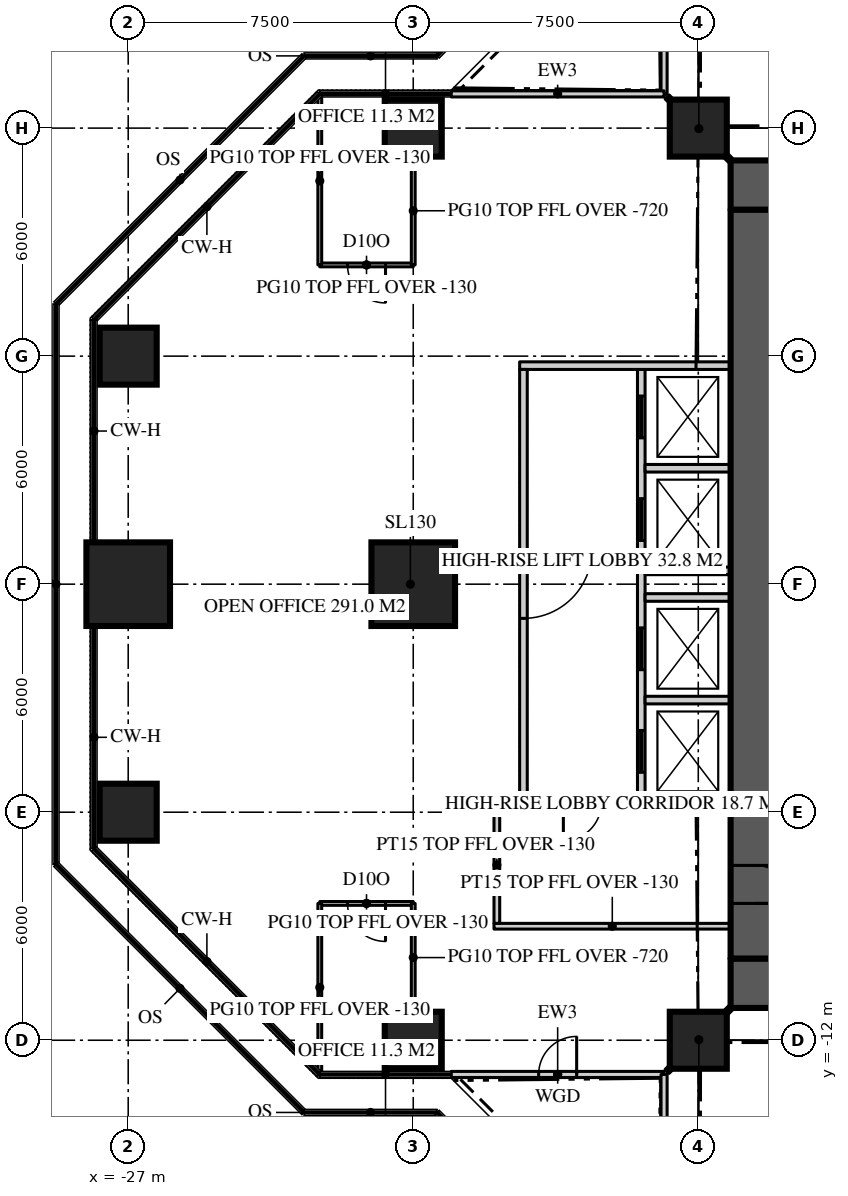
"""IFC4 building model, lengths in metres.
Left out: names, types, materials, properties, quantities, classifications, styles, units other than length and angle.
Written with IfcOpenShell. Run it as: python <this file> out.ifc"""

import sys

from ifc_helpers import new_model, si_unit, direction, frame, frame_2d, origin, origin_2d, place, context, subcontext, project, spatial, rectangle, extrude, element, fill, save


model = new_model("IFC4")
c1 = context("Model", 3, precision=1e-05, world=origin(), true_north=direction((0.0, 1.0)))
c2 = subcontext(c1, "Body", "Model", "MODEL_VIEW")
j1 = project(units=[si_unit("LENGTHUNIT", "METRE"), si_unit("PLANEANGLEUNIT", "RADIAN")], contexts=[c1])
p1 = place(None, origin())
s1 = spatial("IfcSite", under=j1, at=p1, CompositionType="ELEMENT")
p2 = place(p1, origin())
s2 = spatial("IfcBuilding", under=s1, at=p2, CompositionType="ELEMENT")
p3 = place(p2, frame((0.0, 0.0, 212.7)))
s3 = spatial("IfcBuildingStorey", under=s2, at=p3, CompositionType="ELEMENT", Elevation=212.7)
p4 = place(p3, frame((-11.15, 10.5, 0.0), z_axis=(0.0, 0.0, 1.0), x_axis=(1.0, 0.0, 0.0)))
e1 = element("IfcWall", 1, at=p4, inside=s3, PredefinedType="SHEAR", context=c2, shape_type="SweptSolid", body=[
    extrude(rectangle(XDim=22.3, YDim=1.3, at=frame_2d((11.15, 0.0))), origin(), (0.0, 0.0, 1.0), 3.9),
])
p5 = place(p4, frame((4.25, 0.0, 0.0)))
e2 = element("IfcOpeningElement", 2, at=p5, cuts=e1, PredefinedType="OPENING", context=c2, shape_type="SweptSolid", body=[
    extrude(rectangle(XDim=1.8, YDim=2.2, at=frame_2d((0.9, 1.1))), frame((0.0, 0.66, 0.0), z_axis=(0.0, -1.0, 0.0), x_axis=(1.0, 0.0, 0.0)), (0.0, 0.0, 1.0), 1.32),
])
p6 = place(p4, frame((16.25, 0.0, 0.0)))
e3 = element("IfcOpeningElement", 3, at=p6, cuts=e1, PredefinedType="OPENING", context=c2, shape_type="SweptSolid", body=[
    extrude(rectangle(XDim=1.8, YDim=2.2, at=frame_2d((0.9, 1.1))), frame((0.0, 0.66, 0.0), z_axis=(0.0, -1.0, 0.0), x_axis=(1.0, 0.0, 0.0)), (0.0, 0.0, 1.0), 1.32),
])
p7 = place(p3, frame((11.15, -10.5, 0.0), z_axis=(0.0, 0.0, 1.0), x_axis=(-1.0, 0.0, 0.0)))
e4 = element("IfcWall", 4, at=p7, inside=s3, PredefinedType="SHEAR", context=c2, shape_type="SweptSolid", body=[
    extrude(rectangle(XDim=22.3, YDim=1.3, at=frame_2d((11.15, 0.0))), origin(), (0.0, 0.0, 1.0), 3.9),
])
p8 = place(p7, frame((16.25, 0.0, 0.0)))
e5 = element("IfcOpeningElement", 5, at=p8, cuts=e4, PredefinedType="OPENING", context=c2, shape_type="SweptSolid", body=[
    extrude(rectangle(XDim=1.8, YDim=2.2, at=frame_2d((0.9, 1.1))), frame((0.0, 0.66, 0.0), z_axis=(0.0, -1.0, 0.0), x_axis=(1.0, 0.0, 0.0)), (0.0, 0.0, 1.0), 1.32),
])
p9 = place(p7, frame((4.25, 0.0, 0.0)))
e6 = element("IfcOpeningElement", 6, at=p9, cuts=e4, PredefinedType="OPENING", context=c2, shape_type="SweptSolid", body=[
    extrude(rectangle(XDim=1.8, YDim=2.2, at=frame_2d((0.9, 1.1))), frame((0.0, 0.66, 0.0), z_axis=(0.0, -1.0, 0.0), x_axis=(1.0, 0.0, 0.0)), (0.0, 0.0, 1.0), 1.32),
])
p10 = place(p3, frame((-10.5, 9.85, 0.0), z_axis=(0.0, 0.0, 1.0), x_axis=(0.0, -1.0, 0.0)))
e7 = element("IfcWall", 7, at=p10, inside=s3, PredefinedType="SHEAR", context=c2, shape_type="SweptSolid", body=[
    extrude(rectangle(XDim=19.7, YDim=1.3, at=frame_2d((9.85, 0.0))), origin(), (0.0, 0.0, 1.0), 3.9),
])
p11 = place(p10, frame((17.25, 0.0, 0.0)))
e8 = element("IfcOpeningElement", 8, at=p11, cuts=e7, PredefinedType="OPENING", context=c2, shape_type="SweptSolid", body=[
    extrude(rectangle(XDim=1.0, YDim=2.2, at=frame_2d((0.5, 1.1))), frame((0.0, 0.66, 0.0), z_axis=(0.0, -1.0, 0.0), x_axis=(1.0, 0.0, 0.0)), (0.0, 0.0, 1.0), 1.32),
])
for number, where, z_axis, x_axis in (
    (9, (-19.5, -12.0, 0.0), (0.0, 0.0, 1.0), (1.0, 0.0, 0.0)),
    (10, (-12.0, -12.0, 0.0), (0.0, 0.0, 1.0), (1.0, 0.0, 0.0)),
    (11, (-27.0, -6.0, 0.0), (0.0, 0.0, 1.0), (1.0, 0.0, 0.0)),
):
    element("IfcColumn", number, at=place(p3, frame(where, z_axis=z_axis, x_axis=x_axis)), inside=s3, PredefinedType="COLUMN", context=c2, shape_type="SweptSolid", body=[
        extrude(rectangle(XDim=1.5, YDim=1.5, at=origin_2d()), origin(), (0.0, 0.0, 1.0), 3.9),
    ])
for number, where, z_axis, x_axis in (
    (12, (-27.0, 0.0, 0.0), (0.0, 0.0, 1.0), (1.0, 0.0, 0.0)),
    (13, (-19.5, 0.0, 0.0), (0.0, 0.0, 1.0), (1.0, 0.0, 0.0)),
):
    element("IfcColumn", number, at=place(p3, frame(where, z_axis=z_axis, x_axis=x_axis)), inside=s3, PredefinedType="COLUMN", context=c2, shape_type="SweptSolid", body=[
        extrude(rectangle(XDim=2.2, YDim=2.2, at=origin_2d()), origin(), (0.0, 0.0, 1.0), 3.9),
    ])
for number, where, z_axis, x_axis in (
    (14, (-27.0, 6.0, 0.0), (0.0, 0.0, 1.0), (1.0, 0.0, 0.0)),
    (15, (-19.5, 12.0, 0.0), (0.0, 0.0, 1.0), (1.0, 0.0, 0.0)),
    (16, (-12.0, 12.0, 0.0), (0.0, 0.0, 1.0), (1.0, 0.0, 0.0)),
):
    element("IfcColumn", number, at=place(p3, frame(where, z_axis=z_axis, x_axis=x_axis)), inside=s3, PredefinedType="COLUMN", context=c2, shape_type="SweptSolid", body=[
        extrude(rectangle(XDim=1.5, YDim=1.5, at=origin_2d()), origin(), (0.0, 0.0, 1.0), 3.9),
    ])
p12 = place(p3, frame((-12.9, 18.5, 0.0), z_axis=(0.0, 0.0, 1.0), x_axis=(0.0, -1.0, 0.0)))
e17 = element("IfcWall", 17, at=p12, inside=s3, PredefinedType="SOLIDWALL", context=c2, shape_type="SweptSolid", body=[
    extrude(rectangle(XDim=5.6, YDim=0.16, at=frame_2d((2.8, 0.0))), origin(), (0.0, 0.0, 1.0), 3.77),
])
p13 = place(p12, frame((2.3, 0.0, 0.0)))
e18 = element("IfcOpeningElement", 18, at=p13, cuts=e17, PredefinedType="OPENING", context=c2, shape_type="SweptSolid", body=[
    extrude(rectangle(XDim=1.0, YDim=2.2, at=frame_2d((0.5, 1.1))), frame((0.0, 0.09, 0.0), z_axis=(0.0, -1.0, 0.0), x_axis=(1.0, 0.0, 0.0)), (0.0, 0.0, 1.0), 0.18),
])
p14 = place(p3, frame((-12.9, 12.9, 0.0), z_axis=(0.0, 0.0, 1.0), x_axis=(-1.0, 0.0, 0.0)))
e19 = element("IfcWall", 19, at=p14, inside=s3, PredefinedType="SOLIDWALL", context=c2, shape_type="SweptSolid", body=[
    extrude(rectangle(XDim=5.6, YDim=0.16, at=frame_2d((2.8, 0.0))), origin(), (0.0, 0.0, 1.0), 3.77),
])
p15 = place(p3, frame((-18.5, -12.9, 0.0), z_axis=(0.0, 0.0, 1.0), x_axis=(1.0, 0.0, 0.0)))
e20 = element("IfcWall", 20, at=p15, inside=s3, PredefinedType="SOLIDWALL", context=c2, shape_type="SweptSolid", body=[
    extrude(rectangle(XDim=5.6, YDim=0.16, at=frame_2d((2.8, 0.0))), origin(), (0.0, 0.0, 1.0), 3.77),
])
p16 = place(p15, frame((2.3, 0.0, 0.0)))
e21 = element("IfcOpeningElement", 21, at=p16, cuts=e20, PredefinedType="OPENING", context=c2, shape_type="SweptSolid", body=[
    extrude(rectangle(XDim=1.0, YDim=2.2, at=frame_2d((0.5, 1.1))), frame((0.0, 0.09, 0.0), z_axis=(0.0, -1.0, 0.0), x_axis=(1.0, 0.0, 0.0)), (0.0, 0.0, 1.0), 0.18),
])
p17 = place(p3, frame((-12.9, -12.9, 0.0), z_axis=(0.0, 0.0, 1.0), x_axis=(0.0, -1.0, 0.0)))
e22 = element("IfcWall", 22, at=p17, inside=s3, PredefinedType="SOLIDWALL", context=c2, shape_type="SweptSolid", body=[
    extrude(rectangle(XDim=5.6, YDim=0.16, at=frame_2d((2.8, 0.0))), origin(), (0.0, 0.0, 1.0), 3.77),
])
p18 = place(p3, frame((-19.5, -8.4, 0.0), z_axis=(0.0, 0.0, 1.0), x_axis=(-1.0, 0.0, 0.0)))
e23 = element("IfcWall", 23, at=p18, inside=s3, PredefinedType="PARTITIONING", context=c2, shape_type="SweptSolid", body=[
    extrude(rectangle(XDim=2.459, YDim=0.1, at=frame_2d((1.229, 0.0))), origin(), (0.0, 0.0, 1.0), 3.77),
])
p19 = place(p18, frame((0.729, 0.0, 0.0)))
e24 = element("IfcOpeningElement", 24, at=p19, cuts=e23, PredefinedType="OPENING", context=c2, shape_type="SweptSolid", body=[
    extrude(rectangle(XDim=1.0, YDim=2.2, at=frame_2d((0.5, 1.1))), frame((0.0, 0.06, 0.0), z_axis=(0.0, -1.0, 0.0), x_axis=(1.0, 0.0, 0.0)), (0.0, 0.0, 1.0), 0.12),
])
p20 = place(p3, frame((-19.5, -8.4, 0.0), z_axis=(0.0, 0.0, 1.0), x_axis=(0.0, -1.0, 0.0)))
e25 = element("IfcWall", 25, at=p20, inside=s3, PredefinedType="PARTITIONING", context=c2, shape_type="SweptSolid", body=[
    extrude(rectangle(XDim=2.85, YDim=0.1, at=frame_2d((1.425, 0.0))), origin(), (0.0, 0.0, 1.0), 3.18),
])
p21 = place(p3, frame((-21.959, -8.4, 0.0), z_axis=(0.0, 0.0, 1.0), x_axis=(0.0, -1.0, 0.0)))
e26 = element("IfcWall", 26, at=p21, inside=s3, PredefinedType="PARTITIONING", context=c2, shape_type="SweptSolid", body=[
    extrude(rectangle(XDim=4.42, YDim=0.1, at=frame_2d((2.21, 0.0))), origin(), (0.0, 0.0, 1.0), 3.77),
])
p22 = place(p3, frame((-19.5, 8.4, 0.0), z_axis=(0.0, 0.0, 1.0), x_axis=(-1.0, 0.0, 0.0)))
e27 = element("IfcWall", 27, at=p22, inside=s3, PredefinedType="PARTITIONING", context=c2, shape_type="SweptSolid", body=[
    extrude(rectangle(XDim=2.459, YDim=0.1, at=frame_2d((1.229, 0.0))), origin(), (0.0, 0.0, 1.0), 3.77),
])
p23 = place(p22, frame((0.729, 0.0, 0.0)))
e28 = element("IfcOpeningElement", 28, at=p23, cuts=e27, PredefinedType="OPENING", context=c2, shape_type="SweptSolid", body=[
    extrude(rectangle(XDim=1.0, YDim=2.2, at=frame_2d((0.5, 1.1))), frame((0.0, 0.06, 0.0), z_axis=(0.0, -1.0, 0.0), x_axis=(1.0, 0.0, 0.0)), (0.0, 0.0, 1.0), 0.12),
])
p24 = place(p3, frame((-19.5, 8.4, 0.0), z_axis=(0.0, 0.0, 1.0), x_axis=(0.0, 1.0, 0.0)))
e29 = element("IfcWall", 29, at=p24, inside=s3, PredefinedType="PARTITIONING", context=c2, shape_type="SweptSolid", body=[
    extrude(rectangle(XDim=2.85, YDim=0.1, at=frame_2d((1.425, 0.0))), origin(), (0.0, 0.0, 1.0), 3.18),
])
p25 = place(p3, frame((-21.959, 8.4, 0.0), z_axis=(0.0, 0.0, 1.0), x_axis=(0.0, 1.0, 0.0)))
e30 = element("IfcWall", 30, at=p25, inside=s3, PredefinedType="PARTITIONING", context=c2, shape_type="SweptSolid", body=[
    extrude(rectangle(XDim=4.42, YDim=0.1, at=frame_2d((2.21, 0.0))), origin(), (0.0, 0.0, 1.0), 3.77),
])
p26 = place(p3, frame((-13.5, 5.65, 0.0), z_axis=(0.0, 0.0, 1.0), x_axis=(0.0, -1.0, 0.0)))
e31 = element("IfcWall", 31, at=p26, inside=s3, PredefinedType="SOLIDWALL", context=c2, shape_type="SweptSolid", body=[
    extrude(rectangle(XDim=11.3, YDim=0.2, at=frame_2d((5.65, 0.0))), origin(), (0.0, 0.0, 1.0), 3.7),
])
p27 = place(p26, frame((0.7, 0.0, 0.0)))
e32 = element("IfcOpeningElement", 32, at=p27, cuts=e31, PredefinedType="OPENING", context=c2, shape_type="SweptSolid", body=[
    extrude(rectangle(XDim=1.1, YDim=2.2, at=frame_2d((0.55, 1.1))), frame((0.0, 0.11, 0.0), z_axis=(0.0, -1.0, 0.0), x_axis=(1.0, 0.0, 0.0)), (0.0, 0.0, 1.0), 0.22),
])
p28 = place(p26, frame((3.4, 0.0, 0.0)))
e33 = element("IfcOpeningElement", 33, at=p28, cuts=e31, PredefinedType="OPENING", context=c2, shape_type="SweptSolid", body=[
    extrude(rectangle(XDim=1.1, YDim=2.2, at=frame_2d((0.55, 1.1))), frame((0.0, 0.11, 0.0), z_axis=(0.0, -1.0, 0.0), x_axis=(1.0, 0.0, 0.0)), (0.0, 0.0, 1.0), 0.22),
])
p29 = place(p26, frame((6.8, 0.0, 0.0)))
e34 = element("IfcOpeningElement", 34, at=p29, cuts=e31, PredefinedType="OPENING", context=c2, shape_type="SweptSolid", body=[
    extrude(rectangle(XDim=1.1, YDim=2.2, at=frame_2d((0.55, 1.1))), frame((0.0, 0.11, 0.0), z_axis=(0.0, -1.0, 0.0), x_axis=(1.0, 0.0, 0.0)), (0.0, 0.0, 1.0), 0.22),
])
p30 = place(p26, frame((9.5, 0.0, 0.0)))
e35 = element("IfcOpeningElement", 35, at=p30, cuts=e31, PredefinedType="OPENING", context=c2, shape_type="SweptSolid", body=[
    extrude(rectangle(XDim=1.1, YDim=2.2, at=frame_2d((0.55, 1.1))), frame((0.0, 0.11, 0.0), z_axis=(0.0, -1.0, 0.0), x_axis=(1.0, 0.0, 0.0)), (0.0, 0.0, 1.0), 0.22),
])
p31 = place(p3, frame((-11.15, 5.75, 0.0), z_axis=(0.0, 0.0, 1.0), x_axis=(-1.0, 0.0, 0.0)))
e36 = element("IfcWall", 36, at=p31, inside=s3, PredefinedType="SOLIDWALL", context=c2, shape_type="SweptSolid", body=[
    extrude(rectangle(XDim=5.55, YDim=0.2, at=frame_2d((2.775, 0.0))), origin(), (0.0, 0.0, 1.0), 3.7),
])
p32 = place(p3, frame((-11.15, -5.75, 0.0), z_axis=(0.0, 0.0, 1.0), x_axis=(-1.0, 0.0, 0.0)))
e37 = element("IfcWall", 37, at=p32, inside=s3, PredefinedType="SOLIDWALL", context=c2, shape_type="SweptSolid", body=[
    extrude(rectangle(XDim=5.55, YDim=0.2, at=frame_2d((2.775, 0.0))), origin(), (0.0, 0.0, 1.0), 3.7),
])
p33 = place(p32, frame((3.4, 0.0, 0.0)))
e38 = element("IfcOpeningElement", 38, at=p33, cuts=e37, PredefinedType="OPENING", context=c2, shape_type="SweptSolid", body=[
    extrude(rectangle(XDim=1.0, YDim=2.2, at=frame_2d((0.5, 1.1))), frame((0.0, 0.11, 0.0), z_axis=(0.0, -1.0, 0.0), x_axis=(1.0, 0.0, 0.0)), (0.0, 0.0, 1.0), 0.22),
])
for number, where, z_axis, x_axis in (
    (39, (-11.15, 3.05, 0.0), (0.0, 0.0, 1.0), (-1.0, 0.0, 0.0)),
    (40, (-11.15, 0.35, 0.0), (0.0, 0.0, 1.0), (-1.0, 0.0, 0.0)),
    (41, (-11.15, -0.35, 0.0), (0.0, 0.0, 1.0), (-1.0, 0.0, 0.0)),
    (42, (-11.15, -3.05, 0.0), (0.0, 0.0, 1.0), (-1.0, 0.0, 0.0)),
):
    element("IfcWall", number, at=place(p3, frame(where, z_axis=z_axis, x_axis=x_axis)), inside=s3, PredefinedType="SOLIDWALL", context=c2, shape_type="SweptSolid", body=[
        extrude(rectangle(XDim=2.25, YDim=0.2, at=frame_2d((1.125, 0.0))), origin(), (0.0, 0.0, 1.0), 3.7),
    ])
p34 = place(p3, frame((-16.6, 5.65, 0.0), z_axis=(0.0, 0.0, 1.0), x_axis=(0.0, -1.0, 0.0)))
e43 = element("IfcWall", 43, at=p34, inside=s3, PredefinedType="SOLIDWALL", context=c2, shape_type="SweptSolid", body=[
    extrude(rectangle(XDim=11.3, YDim=0.2, at=frame_2d((5.65, 0.0))), origin(), (0.0, 0.0, 1.0), 3.18),
])
p35 = place(p34, frame((4.75, 0.0, 0.0)))
e44 = element("IfcOpeningElement", 44, at=p35, cuts=e43, PredefinedType="OPENING", context=c2, shape_type="SweptSolid", body=[
    extrude(rectangle(XDim=1.8, YDim=2.2, at=frame_2d((0.9, 1.1))), frame((0.0, 0.11, 0.0), z_axis=(0.0, -1.0, 0.0), x_axis=(1.0, 0.0, 0.0)), (0.0, 0.0, 1.0), 0.22),
])
for number, where, z_axis, x_axis in (
    (45, (-11.15, 11.15, 0.0), (0.0, 0.0, 1.0), (-0.707, 0.707, 0.0)),
    (46, (-11.15, -11.15, 0.0), (0.0, 0.0, 1.0), (-0.707, -0.707, 0.0)),
):
    element("IfcWall", number, at=place(p3, frame(where, z_axis=z_axis, x_axis=x_axis)), inside=s3, PredefinedType="PARTITIONING", context=c2, shape_type="SweptSolid", body=[
        extrude(rectangle(XDim=2.362, YDim=0.15, at=frame_2d((1.181, 0.0))), origin(), (0.0, 0.0, 1.0), 3.22),
    ])
p36 = place(p3, frame((-11.15, -9.0, 0.0), z_axis=(0.0, 0.0, 1.0), x_axis=(-1.0, 0.0, 0.0)))
e47 = element("IfcWall", 47, at=p36, inside=s3, PredefinedType="PARTITIONING", context=c2, shape_type="SweptSolid", body=[
    extrude(rectangle(XDim=6.225, YDim=0.15, at=frame_2d((3.113, 0.0))), origin(), (0.0, 0.0, 1.0), 3.77),
])
p37 = place(p3, frame((-17.3, -5.85, 0.0), z_axis=(0.0, 0.0, 1.0), x_axis=(0.0, -1.0, 0.0)))
e48 = element("IfcWall", 48, at=p37, inside=s3, PredefinedType="PARTITIONING", context=c2, shape_type="SweptSolid", body=[
    extrude(rectangle(XDim=3.075, YDim=0.15, at=frame_2d((1.538, 0.0))), origin(), (0.0, 0.0, 1.0), 3.77),
])
p38 = place(p16, origin())
e49 = element("IfcDoor", 49, at=p38, inside=s3, OperationType="SINGLE_SWING_RIGHT", PredefinedType="DOOR", context=c2, shape_type="SweptSolid", body=[
    extrude(rectangle(XDim=1.0, YDim=2.2, at=frame_2d((0.5, 1.1))), frame((0.0, 0.025, 0.0), z_axis=(0.0, -1.0, 0.0), x_axis=(1.0, 0.0, 0.0)), (0.0, 0.0, 1.0), 0.05),
])
fill(e21, e49)
p39 = place(p11, origin())
e50 = element("IfcDoor", 50, at=p39, inside=s3, OperationType="SINGLE_SWING_RIGHT", PredefinedType="DOOR", context=c2, shape_type="SweptSolid", body=[
    extrude(rectangle(XDim=1.0, YDim=2.2, at=frame_2d((0.5, 1.1))), frame((0.0, 0.025, 0.0), z_axis=(0.0, -1.0, 0.0), x_axis=(1.0, 0.0, 0.0)), (0.0, 0.0, 1.0), 0.05),
])
fill(e8, e50)
p40 = place(p19, origin())
e51 = element("IfcDoor", 51, at=p40, inside=s3, OperationType="SINGLE_SWING_LEFT", PredefinedType="DOOR", context=c2, shape_type="SweptSolid", body=[
    extrude(rectangle(XDim=1.0, YDim=2.2, at=frame_2d((0.5, 1.1))), frame((0.0, 0.025, 0.0), z_axis=(0.0, -1.0, 0.0), x_axis=(1.0, 0.0, 0.0)), (0.0, 0.0, 1.0), 0.05),
])
fill(e24, e51)
p41 = place(p23, origin())
e52 = element("IfcDoor", 52, at=p41, inside=s3, OperationType="SINGLE_SWING_LEFT", PredefinedType="DOOR", context=c2, shape_type="SweptSolid", body=[
    extrude(rectangle(XDim=1.0, YDim=2.2, at=frame_2d((0.5, 1.1))), frame((0.0, 0.025, 0.0), z_axis=(0.0, -1.0, 0.0), x_axis=(1.0, 0.0, 0.0)), (0.0, 0.0, 1.0), 0.05),
])
fill(e28, e52)
p42 = place(p35, origin())
e53 = element("IfcDoor", 53, at=p42, inside=s3, OperationType="DOUBLE_DOOR_DOUBLE_SWING", PredefinedType="DOOR", context=c2, shape_type="SweptSolid", body=[
    extrude(rectangle(XDim=1.8, YDim=2.2, at=frame_2d((0.9, 1.1))), frame((0.0, 0.025, 0.0), z_axis=(0.0, -1.0, 0.0), x_axis=(1.0, 0.0, 0.0)), (0.0, 0.0, 1.0), 0.05),
])
fill(e44, e53)
p43 = place(p27, origin())
e54 = element("IfcDoor", 54, at=p43, inside=s3, OperationType="SLIDING_TO_LEFT", PredefinedType="DOOR", context=c2, shape_type="SweptSolid", body=[
    extrude(rectangle(XDim=1.1, YDim=2.2, at=frame_2d((0.55, 1.1))), frame((0.0, 0.025, 0.0), z_axis=(0.0, -1.0, 0.0), x_axis=(1.0, 0.0, 0.0)), (0.0, 0.0, 1.0), 0.05),
])
fill(e32, e54)
p44 = place(p28, origin())
e55 = element("IfcDoor", 55, at=p44, inside=s3, OperationType="SLIDING_TO_LEFT", PredefinedType="DOOR", context=c2, shape_type="SweptSolid", body=[
    extrude(rectangle(XDim=1.1, YDim=2.2, at=frame_2d((0.55, 1.1))), frame((0.0, 0.025, 0.0), z_axis=(0.0, -1.0, 0.0), x_axis=(1.0, 0.0, 0.0)), (0.0, 0.0, 1.0), 0.05),
])
fill(e33, e55)
p45 = place(p29, origin())
e56 = element("IfcDoor", 56, at=p45, inside=s3, OperationType="SLIDING_TO_LEFT", PredefinedType="DOOR", context=c2, shape_type="SweptSolid", body=[
    extrude(rectangle(XDim=1.1, YDim=2.2, at=frame_2d((0.55, 1.1))), frame((0.0, 0.025, 0.0), z_axis=(0.0, -1.0, 0.0), x_axis=(1.0, 0.0, 0.0)), (0.0, 0.0, 1.0), 0.05),
])
fill(e34, e56)
p46 = place(p30, origin())
e57 = element("IfcDoor", 57, at=p46, inside=s3, OperationType="SLIDING_TO_LEFT", PredefinedType="DOOR", context=c2, shape_type="SweptSolid", body=[
    extrude(rectangle(XDim=1.1, YDim=2.2, at=frame_2d((0.55, 1.1))), frame((0.0, 0.025, 0.0), z_axis=(0.0, -1.0, 0.0), x_axis=(1.0, 0.0, 0.0)), (0.0, 0.0, 1.0), 0.05),
])
fill(e35, e57)
p47 = place(p33, origin())
e58 = element("IfcDoor", 58, at=p47, inside=s3, OperationType="SINGLE_SWING_RIGHT", PredefinedType="DOOR", context=c2, shape_type="SweptSolid", body=[
    extrude(rectangle(XDim=1.0, YDim=2.2, at=frame_2d((0.5, 1.1))), frame((0.0, 0.025, 0.0), z_axis=(0.0, -1.0, 0.0), x_axis=(1.0, 0.0, 0.0)), (0.0, 0.0, 1.0), 0.05),
])
fill(e38, e58)
save(model, sys.argv[1])
